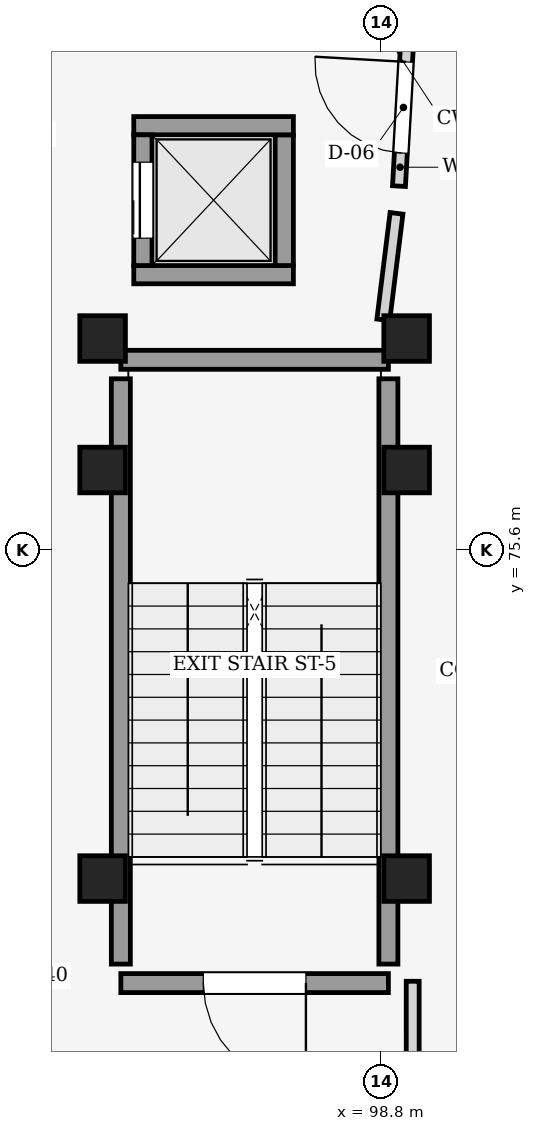
"""IFC4 building model, lengths in metres.
Left out: names, types, materials, properties, quantities, classifications, styles, units other than length and angle.
Written with IfcOpenShell. Run it as: python <this file> out.ifc"""

import sys

from ifc_helpers import new_model, si_unit, direction, frame, frame_2d, origin, origin_2d, place, context, subcontext, project, spatial, rectangle, extrude, element, fill, save


model = new_model("IFC4")
c1 = context("Model", 3, precision=1e-05, world=origin(), true_north=direction((0.0, 1.0)))
c2 = subcontext(c1, "Body", "Model", "MODEL_VIEW")
j1 = project(units=[si_unit("LENGTHUNIT", "METRE"), si_unit("PLANEANGLEUNIT", "RADIAN")], contexts=[c1])
p1 = place(None, origin())
s1 = spatial("IfcSite", under=j1, at=p1, CompositionType="ELEMENT")
p2 = place(p1, origin())
s2 = spatial("IfcBuilding", under=s1, at=p2, CompositionType="ELEMENT")
p3 = place(p2, frame((0.0, 0.0, 5.1)))
s3 = spatial("IfcBuildingStorey", under=s2, at=p3, CompositionType="ELEMENT", Elevation=5.1)
for number, where, z_axis, x_axis in (
    (1, (99.14, 71.275, 0.0), (0.0, 0.0, 1.0), (1.0, 0.0, 0.0)),
    (2, (95.14, 71.275, 0.0), (0.0, 0.0, 1.0), (1.0, 0.0, 0.0)),
    (3, (99.14, 76.65, 0.0), (0.0, 0.0, 1.0), (1.0, 0.0, 0.0)),
    (4, (95.14, 76.65, 0.0), (0.0, 0.0, 1.0), (1.0, 0.0, 0.0)),
    (5, (99.14, 78.38, 0.0), (0.0, 0.0, 1.0), (1.0, 0.0, 0.0)),
    (6, (95.14, 78.38, 0.0), (0.0, 0.0, 1.0), (1.0, 0.0, 0.0)),
):
    element("IfcColumn", number, at=place(p3, frame(where, z_axis=z_axis, x_axis=x_axis)), inside=s3, PredefinedType="COLUMN", context=c2, shape_type="SweptSolid", body=[
        extrude(rectangle(XDim=0.6, YDim=0.6, at=origin_2d()), origin(), (0.0, 0.0, 1.0), 4.05),
    ])
p4 = place(p3, frame((98.9, 69.9, 0.0), z_axis=(0.0, 0.0, 1.0), x_axis=(-1.0, 0.0, 0.0)))
e7 = element("IfcWall", 7, at=p4, inside=s3, PredefinedType="SHEAR", context=c2, shape_type="SweptSolid", body=[
    extrude(rectangle(XDim=3.52, YDim=0.25, at=frame_2d((1.76, 0.0))), origin(), (0.0, 0.0, 1.0), 4.05),
])
p5 = place(p4, frame((1.085, 0.0, 0.0)))
e8 = element("IfcOpeningElement", 8, at=p5, cuts=e7, PredefinedType="OPENING", context=c2, shape_type="SweptSolid", body=[
    extrude(rectangle(XDim=1.35, YDim=2.2, at=frame_2d((0.675, 1.1))), frame((0.0, 0.135, 0.0), z_axis=(0.0, -1.0, 0.0), x_axis=(1.0, 0.0, 0.0)), (0.0, 0.0, 1.0), 0.27),
])
p6 = place(p3, frame((95.38, 70.15, 0.0), z_axis=(0.0, 0.0, 1.0), x_axis=(0.0, 1.0, 0.0)))
e9 = element("IfcWall", 9, at=p6, inside=s3, PredefinedType="SHEAR", context=c2, shape_type="SweptSolid", body=[
    extrude(rectangle(XDim=7.7, YDim=0.25, at=frame_2d((3.85, 0.0))), origin(), (0.0, 0.0, 1.0), 4.05),
])
p7 = place(p3, frame((95.38, 78.1, 0.0), z_axis=(0.0, 0.0, 1.0), x_axis=(1.0, 0.0, 0.0)))
e10 = element("IfcWall", 10, at=p7, inside=s3, PredefinedType="SHEAR", context=c2, shape_type="SweptSolid", body=[
    extrude(rectangle(XDim=3.52, YDim=0.25, at=frame_2d((1.76, 0.0))), origin(), (0.0, 0.0, 1.0), 4.05),
])
p8 = place(p3, frame((98.9, 77.85, 0.0), z_axis=(0.0, 0.0, 1.0), x_axis=(0.0, -1.0, 0.0)))
e11 = element("IfcWall", 11, at=p8, inside=s3, PredefinedType="SHEAR", context=c2, shape_type="SweptSolid", body=[
    extrude(rectangle(XDim=7.7, YDim=0.25, at=frame_2d((3.85, 0.0))), origin(), (0.0, 0.0, 1.0), 4.05),
])
p9 = place(p3, frame((97.65, 79.22, 0.0), z_axis=(0.0, 0.0, 1.0), x_axis=(-1.0, 0.0, 0.0)))
e12 = element("IfcWall", 12, at=p9, inside=s3, PredefinedType="SHEAR", context=c2, shape_type="SweptSolid", body=[
    extrude(rectangle(XDim=2.1, YDim=0.24, at=frame_2d((1.05, 0.0))), origin(), (0.0, 0.0, 1.0), 4.05),
])
p10 = place(p3, frame((97.53, 81.06, 0.0), z_axis=(0.0, 0.0, 1.0), x_axis=(0.0, -1.0, 0.0)))
e13 = element("IfcWall", 13, at=p10, inside=s3, PredefinedType="SHEAR", context=c2, shape_type="SweptSolid", body=[
    extrude(rectangle(XDim=1.72, YDim=0.24, at=frame_2d((0.86, 0.0))), origin(), (0.0, 0.0, 1.0), 4.05),
])
p11 = place(p3, frame((95.55, 81.18, 0.0), z_axis=(0.0, 0.0, 1.0), x_axis=(1.0, 0.0, 0.0)))
e14 = element("IfcWall", 14, at=p11, inside=s3, PredefinedType="SHEAR", context=c2, shape_type="SweptSolid", body=[
    extrude(rectangle(XDim=2.1, YDim=0.24, at=frame_2d((1.05, 0.0))), origin(), (0.0, 0.0, 1.0), 4.05),
])
p12 = place(p3, frame((95.67, 79.34, 0.0), z_axis=(0.0, 0.0, 1.0), x_axis=(0.0, 1.0, 0.0)))
e15 = element("IfcWall", 15, at=p12, inside=s3, PredefinedType="SHEAR", context=c2, shape_type="SweptSolid", body=[
    extrude(rectangle(XDim=1.72, YDim=0.24, at=frame_2d((0.86, 0.0))), origin(), (0.0, 0.0, 1.0), 4.05),
])
p13 = place(p12, frame((0.36, 0.0, 0.0)))
e16 = element("IfcOpeningElement", 16, at=p13, cuts=e15, PredefinedType="OPENING", context=c2, shape_type="SweptSolid", body=[
    extrude(rectangle(XDim=1.0, YDim=2.15, at=frame_2d((0.5, 1.075))), frame((0.0, 0.13, 0.0), z_axis=(0.0, -1.0, 0.0), x_axis=(1.0, 0.0, 0.0)), (0.0, 0.0, 1.0), 0.26),
])
p14 = place(p3, frame((98.833, 78.626, 0.0), z_axis=(0.0, 0.0, 1.0), x_axis=(0.122949227409, 0.992412962168, 0.0)))
e17 = element("IfcWall", 17, at=p14, inside=s3, PredefinedType="PARTITIONING", context=c2, shape_type="SweptSolid", body=[
    extrude(rectangle(XDim=1.412, YDim=0.17, at=frame_2d((0.706, 0.0))), origin(), (0.0, 0.0, 1.0), 2.45),
])
p15 = place(p3, frame((99.039, 80.385, 0.0), z_axis=(0.0, 0.0, 1.0), x_axis=(0.056708032982, 0.998390804743, 0.0)))
e18 = element("IfcWall", 18, at=p15, inside=s3, PredefinedType="PARTITIONING", context=c2, shape_type="SweptSolid", body=[
    extrude(rectangle(XDim=2.075, YDim=0.17, at=frame_2d((1.038, 0.0))), origin(), (0.0, 0.0, 1.0), 3.68),
])
p16 = place(p15, frame((0.437, 0.0, 0.0)))
e19 = element("IfcOpeningElement", 19, at=p16, cuts=e18, PredefinedType="OPENING", context=c2, shape_type="SweptSolid", body=[
    extrude(rectangle(XDim=1.2, YDim=2.1, at=frame_2d((0.6, 1.05))), frame((0.0, 0.095, 0.0), z_axis=(0.0, -1.0, 0.0), x_axis=(1.0, 0.0, 0.0)), (0.0, 0.0, 1.0), 0.19),
])
p17 = place(p3, frame((99.22, 68.503, 0.0), z_axis=(0.0, 0.0, 1.0), x_axis=(-0.000171791786, 0.999999985244, 0.0)))
e20 = element("IfcWall", 20, at=p17, inside=s3, PredefinedType="PARTITIONING", context=c2, shape_type="SweptSolid", body=[
    extrude(rectangle(XDim=1.421, YDim=0.17, at=frame_2d((0.71, 0.0))), origin(), (0.0, 0.0, 1.0), 3.68),
])
p18 = place(p5, origin())
e21 = element("IfcDoor", 21, at=p18, inside=s3, OperationType="SINGLE_SWING_LEFT", PredefinedType="DOOR", context=c2, shape_type="SweptSolid", body=[
    extrude(rectangle(XDim=1.35, YDim=2.2, at=frame_2d((0.675, 1.1))), frame((0.0, 0.025, 0.0), z_axis=(0.0, -1.0, 0.0), x_axis=(1.0, 0.0, 0.0)), (0.0, 0.0, 1.0), 0.05),
])
fill(e8, e21)
p19 = place(p13, origin())
e22 = element("IfcDoor", 22, at=p19, inside=s3, OperationType="SLIDING_TO_LEFT", PredefinedType="DOOR", context=c2, shape_type="SweptSolid", body=[
    extrude(rectangle(XDim=1.0, YDim=2.15, at=frame_2d((0.5, 1.075))), frame((0.0, 0.025, 0.0), z_axis=(0.0, -1.0, 0.0), x_axis=(1.0, 0.0, 0.0)), (0.0, 0.0, 1.0), 0.05),
])
fill(e16, e22)
p20 = place(p16, origin())
e23 = element("IfcDoor", 23, at=p20, inside=s3, OperationType="SINGLE_SWING_RIGHT", PredefinedType="DOOR", context=c2, shape_type="SweptSolid", body=[
    extrude(rectangle(XDim=1.2, YDim=2.1, at=frame_2d((0.6, 1.05))), frame((0.0, 0.025, 0.0), z_axis=(0.0, -1.0, 0.0), x_axis=(1.0, 0.0, 0.0)), (0.0, 0.0, 1.0), 0.05),
])
fill(e19, e23)
save(model, sys.argv[1])
